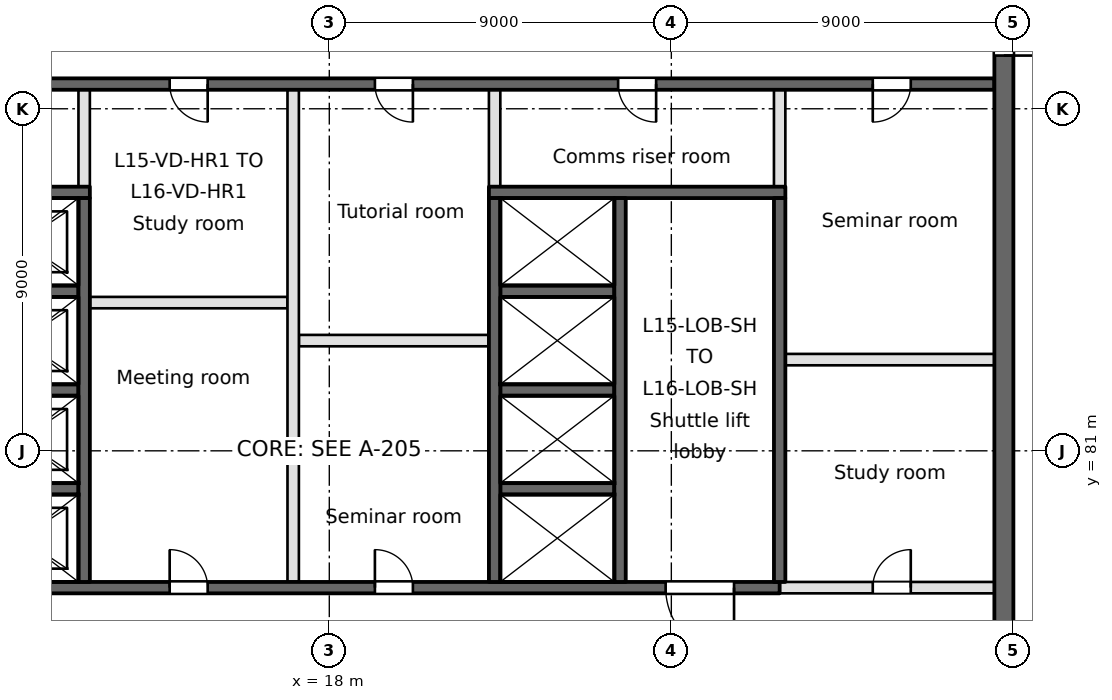
"""IFC4 building model, lengths in metres.
Left out: names, types, materials, properties, quantities, classifications, styles, units other than length and angle.
Written with IfcOpenShell. Run it as: python <this file> out.ifc"""

import sys

from ifc_helpers import new_model, si_unit, direction, frame, frame_2d, origin, place, context, subcontext, project, spatial, rectangle, extrude, element, fill, save


model = new_model("IFC4")
c1 = context("Model", 3, precision=1e-05, world=origin(), true_north=direction((0.0, 1.0)))
c2 = subcontext(c1, "Body", "Model", "MODEL_VIEW")
j1 = project(units=[si_unit("LENGTHUNIT", "METRE"), si_unit("PLANEANGLEUNIT", "RADIAN")], contexts=[c1])
p1 = place(None, origin())
s1 = spatial("IfcSite", under=j1, at=p1, CompositionType="ELEMENT")
p2 = place(p1, origin())
s2 = spatial("IfcBuilding", under=s1, at=p2, CompositionType="ELEMENT")
p3 = place(p2, frame((0.0, 0.0, 65.4)))
s3 = spatial("IfcBuildingStorey", under=s2, at=p3, CompositionType="ELEMENT", Elevation=65.4)
p4 = place(p3, frame((0.9, 77.4, -0.4), z_axis=(0.0, 0.0, 1.0), x_axis=(1.0, 0.0, 0.0)))
e1 = element("IfcWall", 1, at=p4, inside=s3, PredefinedType="SOLIDWALL", context=c2, shape_type="SweptSolid", body=[
    extrude(rectangle(XDim=28.95, YDim=0.3, at=frame_2d((14.475, 0.0))), origin(), (0.0, 0.0, 1.0), 3.7),
])
p5 = place(p4, frame((4.35, 0.0, 0.4)))
e2 = element("IfcOpeningElement", 2, at=p5, cuts=e1, PredefinedType="OPENING", context=c2, shape_type="SweptSolid", body=[
    extrude(rectangle(XDim=1.8, YDim=2.1, at=frame_2d((0.9, 1.05))), frame((0.0, 0.15, 0.0), z_axis=(0.0, -1.0, 0.0), x_axis=(1.0, 0.0, 0.0)), (0.0, 0.0, 1.0), 0.3),
])
p6 = place(p4, frame((25.95, 0.0, 0.4)))
e3 = element("IfcOpeningElement", 3, at=p6, cuts=e1, PredefinedType="OPENING", context=c2, shape_type="SweptSolid", body=[
    extrude(rectangle(XDim=1.8, YDim=2.1, at=frame_2d((0.9, 1.05))), frame((0.0, 0.15, 0.0), z_axis=(0.0, -1.0, 0.0), x_axis=(1.0, 0.0, 0.0)), (0.0, 0.0, 1.0), 0.3),
])
p7 = place(p4, frame((12.9, 0.0, 0.4)))
e4 = element("IfcOpeningElement", 4, at=p7, cuts=e1, PredefinedType="OPENING", context=c2, shape_type="SweptSolid", body=[
    extrude(rectangle(XDim=1.0, YDim=2.1, at=frame_2d((0.5, 1.05))), frame((0.0, 0.15, 0.0), z_axis=(0.0, -1.0, 0.0), x_axis=(1.0, 0.0, 0.0)), (0.0, 0.0, 1.0), 0.3),
])
p8 = place(p4, frame((18.3, 0.0, 0.4)))
e5 = element("IfcOpeningElement", 5, at=p8, cuts=e1, PredefinedType="OPENING", context=c2, shape_type="SweptSolid", body=[
    extrude(rectangle(XDim=1.0, YDim=2.1, at=frame_2d((0.5, 1.05))), frame((0.0, 0.15, 0.0), z_axis=(0.0, -1.0, 0.0), x_axis=(1.0, 0.0, 0.0)), (0.0, 0.0, 1.0), 0.3),
])
p9 = place(p3, frame((29.85, 77.4, 0.0), z_axis=(0.0, 0.0, 1.0), x_axis=(1.0, 0.0, 0.0)))
e6 = element("IfcWall", 6, at=p9, inside=s3, PredefinedType="PARTITIONING", context=c2, shape_type="SweptSolid", body=[
    extrude(rectangle(XDim=5.65, YDim=0.3, at=frame_2d((2.825, 0.0))), origin(), (0.0, 0.0, 1.0), 3.3),
])
p10 = place(p9, frame((2.45, 0.0, 0.0)))
e7 = element("IfcOpeningElement", 7, at=p10, cuts=e6, PredefinedType="OPENING", context=c2, shape_type="SweptSolid", body=[
    extrude(rectangle(XDim=1.0, YDim=2.1, at=frame_2d((0.5, 1.05))), frame((0.0, 0.15, 0.0), z_axis=(0.0, -1.0, 0.0), x_axis=(1.0, 0.0, 0.0)), (0.0, 0.0, 1.0), 0.3),
])
for number, where, z_axis, x_axis in (
    (8, (8.4, 80.0, -0.4), (0.0, 0.0, 1.0), (1.0, 0.0, 0.0)),
    (9, (22.5, 80.0, -0.4), (0.0, 0.0, 1.0), (1.0, 0.0, 0.0)),
    (10, (8.4, 82.6, -0.4), (0.0, 0.0, 1.0), (1.0, 0.0, 0.0)),
    (11, (22.5, 82.6, -0.4), (0.0, 0.0, 1.0), (1.0, 0.0, 0.0)),
):
    element("IfcWall", number, at=place(p3, frame(where, z_axis=z_axis, x_axis=x_axis)), inside=s3, PredefinedType="SOLIDWALL", context=c2, shape_type="SweptSolid", body=[
        extrude(rectangle(XDim=3.0, YDim=0.3, at=frame_2d((1.5, 0.0))), origin(), (0.0, 0.0, 1.0), 3.7),
    ])
p11 = place(p3, frame((30.0, 83.4, 0.0), z_axis=(0.0, 0.0, 1.0), x_axis=(1.0, 0.0, 0.0)))
e12 = element("IfcWall", 12, at=p11, inside=s3, PredefinedType="PARTITIONING", context=c2, shape_type="SweptSolid", body=[
    extrude(rectangle(XDim=5.5, YDim=0.3, at=frame_2d((2.75, 0.0))), origin(), (0.0, 0.0, 1.0), 3.3),
])
p12 = place(p3, frame((17.2, 83.9, 0.0), z_axis=(0.0, 0.0, 1.0), x_axis=(1.0, 0.0, 0.0)))
e13 = element("IfcWall", 13, at=p12, inside=s3, PredefinedType="PARTITIONING", context=c2, shape_type="SweptSolid", body=[
    extrude(rectangle(XDim=5.0, YDim=0.3, at=frame_2d((2.5, 0.0))), origin(), (0.0, 0.0, 1.0), 3.3),
])
p13 = place(p3, frame((11.7, 84.9, 0.0), z_axis=(0.0, 0.0, 1.0), x_axis=(1.0, 0.0, 0.0)))
e14 = element("IfcWall", 14, at=p13, inside=s3, PredefinedType="PARTITIONING", context=c2, shape_type="SweptSolid", body=[
    extrude(rectangle(XDim=5.2, YDim=0.3, at=frame_2d((2.6, 0.0))), origin(), (0.0, 0.0, 1.0), 3.3),
])
for number, where, z_axis, x_axis in (
    (15, (8.4, 85.2, -0.4), (0.0, 0.0, 1.0), (1.0, 0.0, 0.0)),
    (16, (22.5, 85.2, -0.4), (0.0, 0.0, 1.0), (1.0, 0.0, 0.0)),
):
    element("IfcWall", number, at=place(p3, frame(where, z_axis=z_axis, x_axis=x_axis)), inside=s3, PredefinedType="SOLIDWALL", context=c2, shape_type="SweptSolid", body=[
        extrude(rectangle(XDim=3.0, YDim=0.3, at=frame_2d((1.5, 0.0))), origin(), (0.0, 0.0, 1.0), 3.7),
    ])
p14 = place(p3, frame((0.9, 87.8, -0.4), z_axis=(0.0, 0.0, 1.0), x_axis=(1.0, 0.0, 0.0)))
e17 = element("IfcWall", 17, at=p14, inside=s3, PredefinedType="SOLIDWALL", context=c2, shape_type="SweptSolid", body=[
    extrude(rectangle(XDim=10.8, YDim=0.3, at=frame_2d((5.4, 0.0))), origin(), (0.0, 0.0, 1.0), 3.7),
])
p15 = place(p3, frame((22.2, 87.8, -0.4), z_axis=(0.0, 0.0, 1.0), x_axis=(1.0, 0.0, 0.0)))
e18 = element("IfcWall", 18, at=p15, inside=s3, PredefinedType="SOLIDWALL", context=c2, shape_type="SweptSolid", body=[
    extrude(rectangle(XDim=7.8, YDim=0.3, at=frame_2d((3.9, 0.0))), origin(), (0.0, 0.0, 1.0), 3.7),
])
p16 = place(p3, frame((0.9, 90.65, -0.4), z_axis=(0.0, 0.0, 1.0), x_axis=(1.0, 0.0, 0.0)))
e19 = element("IfcWall", 19, at=p16, inside=s3, PredefinedType="SOLIDWALL", context=c2, shape_type="SweptSolid", body=[
    extrude(rectangle(XDim=34.6, YDim=0.3, at=frame_2d((17.3, 0.0))), origin(), (0.0, 0.0, 1.0), 3.7),
])
p17 = place(p16, frame((4.75, 0.0, 0.4)))
e20 = element("IfcOpeningElement", 20, at=p17, cuts=e19, PredefinedType="OPENING", context=c2, shape_type="SweptSolid", body=[
    extrude(rectangle(XDim=1.0, YDim=2.1, at=frame_2d((0.5, 1.05))), frame((0.0, 0.15, 0.0), z_axis=(0.0, -1.0, 0.0), x_axis=(1.0, 0.0, 0.0)), (0.0, 0.0, 1.0), 0.3),
])
p18 = place(p16, frame((24.7, 0.0, 0.4)))
e21 = element("IfcOpeningElement", 21, at=p18, cuts=e19, PredefinedType="OPENING", context=c2, shape_type="SweptSolid", body=[
    extrude(rectangle(XDim=1.0, YDim=2.1, at=frame_2d((0.5, 1.05))), frame((0.0, 0.15, 0.0), z_axis=(0.0, -1.0, 0.0), x_axis=(1.0, 0.0, 0.0)), (0.0, 0.0, 1.0), 0.3),
])
p19 = place(p16, frame((12.9, 0.0, 0.4)))
e22 = element("IfcOpeningElement", 22, at=p19, cuts=e19, PredefinedType="OPENING", context=c2, shape_type="SweptSolid", body=[
    extrude(rectangle(XDim=1.0, YDim=2.1, at=frame_2d((0.5, 1.05))), frame((0.0, 0.15, 0.0), z_axis=(0.0, -1.0, 0.0), x_axis=(1.0, 0.0, 0.0)), (0.0, 0.0, 1.0), 0.3),
])
p20 = place(p16, frame((18.3, 0.0, 0.4)))
e23 = element("IfcOpeningElement", 23, at=p20, cuts=e19, PredefinedType="OPENING", context=c2, shape_type="SweptSolid", body=[
    extrude(rectangle(XDim=1.0, YDim=2.1, at=frame_2d((0.5, 1.05))), frame((0.0, 0.15, 0.0), z_axis=(0.0, -1.0, 0.0), x_axis=(1.0, 0.0, 0.0)), (0.0, 0.0, 1.0), 0.3),
])
p21 = place(p16, frame((31.4, 0.0, 0.4)))
e24 = element("IfcOpeningElement", 24, at=p21, cuts=e19, PredefinedType="OPENING", context=c2, shape_type="SweptSolid", body=[
    extrude(rectangle(XDim=1.0, YDim=2.1, at=frame_2d((0.5, 1.05))), frame((0.0, 0.15, 0.0), z_axis=(0.0, -1.0, 0.0), x_axis=(1.0, 0.0, 0.0)), (0.0, 0.0, 1.0), 0.3),
])
p22 = place(p3, frame((11.55, 77.55, -0.4), z_axis=(0.0, 0.0, 1.0), x_axis=(0.0, 1.0, 0.0)))
e25 = element("IfcWall", 25, at=p22, inside=s3, PredefinedType="SOLIDWALL", context=c2, shape_type="SweptSolid", body=[
    extrude(rectangle(XDim=10.1, YDim=0.3, at=frame_2d((5.05, 0.0))), origin(), (0.0, 0.0, 1.0), 3.7),
])
p23 = place(p3, frame((11.55, 87.95, 0.0), z_axis=(0.0, 0.0, 1.0), x_axis=(0.0, 1.0, 0.0)))
e26 = element("IfcWall", 26, at=p23, inside=s3, PredefinedType="PARTITIONING", context=c2, shape_type="SweptSolid", body=[
    extrude(rectangle(XDim=2.55, YDim=0.3, at=frame_2d((1.275, 0.0))), origin(), (0.0, 0.0, 1.0), 3.3),
])
p24 = place(p3, frame((17.05, 77.55, 0.0), z_axis=(0.0, 0.0, 1.0), x_axis=(0.0, 1.0, 0.0)))
e27 = element("IfcWall", 27, at=p24, inside=s3, PredefinedType="PARTITIONING", context=c2, shape_type="SweptSolid", body=[
    extrude(rectangle(XDim=12.95, YDim=0.3, at=frame_2d((6.475, 0.0))), origin(), (0.0, 0.0, 1.0), 3.3),
])
p25 = place(p3, frame((22.35, 77.55, -0.4), z_axis=(0.0, 0.0, 1.0), x_axis=(0.0, 1.0, 0.0)))
e28 = element("IfcWall", 28, at=p25, inside=s3, PredefinedType="SOLIDWALL", context=c2, shape_type="SweptSolid", body=[
    extrude(rectangle(XDim=10.1, YDim=0.3, at=frame_2d((5.05, 0.0))), origin(), (0.0, 0.0, 1.0), 3.7),
])
p26 = place(p3, frame((22.35, 87.95, 0.0), z_axis=(0.0, 0.0, 1.0), x_axis=(0.0, 1.0, 0.0)))
e29 = element("IfcWall", 29, at=p26, inside=s3, PredefinedType="PARTITIONING", context=c2, shape_type="SweptSolid", body=[
    extrude(rectangle(XDim=2.55, YDim=0.3, at=frame_2d((1.275, 0.0))), origin(), (0.0, 0.0, 1.0), 3.3),
])
for number, where, z_axis, x_axis in (
    (30, (25.65, 77.55, -0.4), (0.0, 0.0, 1.0), (0.0, 1.0, 0.0)),
    (31, (29.85, 77.55, -0.4), (0.0, 0.0, 1.0), (0.0, 1.0, 0.0)),
):
    element("IfcWall", number, at=place(p3, frame(where, z_axis=z_axis, x_axis=x_axis)), inside=s3, PredefinedType="SOLIDWALL", context=c2, shape_type="SweptSolid", body=[
        extrude(rectangle(XDim=10.1, YDim=0.3, at=frame_2d((5.05, 0.0))), origin(), (0.0, 0.0, 1.0), 3.7),
    ])
p27 = place(p3, frame((29.85, 87.95, 0.0), z_axis=(0.0, 0.0, 1.0), x_axis=(0.0, 1.0, 0.0)))
e32 = element("IfcWall", 32, at=p27, inside=s3, PredefinedType="PARTITIONING", context=c2, shape_type="SweptSolid", body=[
    extrude(rectangle(XDim=2.55, YDim=0.3, at=frame_2d((1.275, 0.0))), origin(), (0.0, 0.0, 1.0), 3.3),
])
p28 = place(p3, frame((35.75, 63.5, -0.4), z_axis=(0.0, 0.0, 1.0), x_axis=(0.0, 1.0, 0.0)))
e33 = element("IfcWall", 33, at=p28, inside=s3, PredefinedType="SOLIDWALL", context=c2, shape_type="SweptSolid", body=[
    extrude(rectangle(XDim=34.6, YDim=0.5, at=frame_2d((17.3, 0.0))), origin(), (0.0, 0.0, 1.0), 3.7),
])
p29 = place(p28, frame((9.7, 0.0, 0.4)))
e34 = element("IfcOpeningElement", 34, at=p29, cuts=e33, PredefinedType="OPENING", context=c2, shape_type="SweptSolid", body=[
    extrude(rectangle(XDim=2.4, YDim=2.1, at=frame_2d((1.2, 1.05))), frame((0.0, 0.25, 0.0), z_axis=(0.0, -1.0, 0.0), x_axis=(1.0, 0.0, 0.0)), (0.0, 0.0, 1.0), 0.5),
])
p30 = place(p28, frame((27.9, 0.0, 0.4)))
e35 = element("IfcOpeningElement", 35, at=p30, cuts=e33, PredefinedType="OPENING", context=c2, shape_type="SweptSolid", body=[
    extrude(rectangle(XDim=1.5, YDim=2.1, at=frame_2d((0.75, 1.05))), frame((0.0, 0.25, 0.0), z_axis=(0.0, -1.0, 0.0), x_axis=(1.0, 0.0, 0.0)), (0.0, 0.0, 1.0), 0.5),
])
p31 = place(p28, frame((1.5, 0.0, 0.4)))
e36 = element("IfcOpeningElement", 36, at=p31, cuts=e33, PredefinedType="OPENING", context=c2, shape_type="SweptSolid", body=[
    extrude(rectangle(XDim=1.2, YDim=2.1, at=frame_2d((0.6, 1.05))), frame((0.0, 0.25, 0.0), z_axis=(0.0, -1.0, 0.0), x_axis=(1.0, 0.0, 0.0)), (0.0, 0.0, 1.0), 0.5),
])
p32 = place(p6, frame((1.8, 0.0, 0.0), z_axis=(0.0, 0.0, 1.0), x_axis=(-1.0, 0.0, 0.0)))
e37 = element("IfcDoor", 37, at=p32, inside=s3, OperationType="SINGLE_SWING_LEFT", PredefinedType="DOOR", context=c2, shape_type="SweptSolid", body=[
    extrude(rectangle(XDim=1.8, YDim=2.1, at=frame_2d((0.9, 1.05))), frame((0.0, 0.025, 0.0), z_axis=(0.0, -1.0, 0.0), x_axis=(1.0, 0.0, 0.0)), (0.0, 0.0, 1.0), 0.05),
])
fill(e3, e37)
p33 = place(p30, frame((1.5, 0.0, 0.0), z_axis=(0.0, 0.0, 1.0), x_axis=(-1.0, 0.0, 0.0)))
e38 = element("IfcDoor", 38, at=p33, inside=s3, OperationType="SINGLE_SWING_RIGHT", PredefinedType="DOOR", context=c2, shape_type="SweptSolid", body=[
    extrude(rectangle(XDim=1.5, YDim=2.1, at=frame_2d((0.75, 1.05))), frame((0.0, 0.025, 0.0), z_axis=(0.0, -1.0, 0.0), x_axis=(1.0, 0.0, 0.0)), (0.0, 0.0, 1.0), 0.05),
])
fill(e35, e38)
p34 = place(p18, frame((1.0, 0.0, 0.0), z_axis=(0.0, 0.0, 1.0), x_axis=(-1.0, 0.0, 0.0)))
e39 = element("IfcDoor", 39, at=p34, inside=s3, OperationType="SINGLE_SWING_LEFT", PredefinedType="DOOR", context=c2, shape_type="SweptSolid", body=[
    extrude(rectangle(XDim=1.0, YDim=2.1, at=frame_2d((0.5, 1.05))), frame((0.0, 0.025, 0.0), z_axis=(0.0, -1.0, 0.0), x_axis=(1.0, 0.0, 0.0)), (0.0, 0.0, 1.0), 0.05),
])
fill(e21, e39)
p35 = place(p7, origin())
e40 = element("IfcDoor", 40, at=p35, inside=s3, OperationType="SINGLE_SWING_LEFT", PredefinedType="DOOR", context=c2, shape_type="SweptSolid", body=[
    extrude(rectangle(XDim=1.0, YDim=2.1, at=frame_2d((0.5, 1.05))), frame((0.0, 0.025, 0.0), z_axis=(0.0, -1.0, 0.0), x_axis=(1.0, 0.0, 0.0)), (0.0, 0.0, 1.0), 0.05),
])
fill(e4, e40)
p36 = place(p19, frame((1.0, 0.0, 0.0), z_axis=(0.0, 0.0, 1.0), x_axis=(-1.0, 0.0, 0.0)))
e41 = element("IfcDoor", 41, at=p36, inside=s3, OperationType="SINGLE_SWING_LEFT", PredefinedType="DOOR", context=c2, shape_type="SweptSolid", body=[
    extrude(rectangle(XDim=1.0, YDim=2.1, at=frame_2d((0.5, 1.05))), frame((0.0, 0.025, 0.0), z_axis=(0.0, -1.0, 0.0), x_axis=(1.0, 0.0, 0.0)), (0.0, 0.0, 1.0), 0.05),
])
fill(e22, e41)
p37 = place(p8, origin())
e42 = element("IfcDoor", 42, at=p37, inside=s3, OperationType="SINGLE_SWING_LEFT", PredefinedType="DOOR", context=c2, shape_type="SweptSolid", body=[
    extrude(rectangle(XDim=1.0, YDim=2.1, at=frame_2d((0.5, 1.05))), frame((0.0, 0.025, 0.0), z_axis=(0.0, -1.0, 0.0), x_axis=(1.0, 0.0, 0.0)), (0.0, 0.0, 1.0), 0.05),
])
fill(e5, e42)
p38 = place(p20, frame((1.0, 0.0, 0.0), z_axis=(0.0, 0.0, 1.0), x_axis=(-1.0, 0.0, 0.0)))
e43 = element("IfcDoor", 43, at=p38, inside=s3, OperationType="SINGLE_SWING_LEFT", PredefinedType="DOOR", context=c2, shape_type="SweptSolid", body=[
    extrude(rectangle(XDim=1.0, YDim=2.1, at=frame_2d((0.5, 1.05))), frame((0.0, 0.025, 0.0), z_axis=(0.0, -1.0, 0.0), x_axis=(1.0, 0.0, 0.0)), (0.0, 0.0, 1.0), 0.05),
])
fill(e23, e43)
p39 = place(p10, origin())
e44 = element("IfcDoor", 44, at=p39, inside=s3, OperationType="SINGLE_SWING_RIGHT", PredefinedType="DOOR", context=c2, shape_type="SweptSolid", body=[
    extrude(rectangle(XDim=1.0, YDim=2.1, at=frame_2d((0.5, 1.05))), frame((0.0, 0.025, 0.0), z_axis=(0.0, -1.0, 0.0), x_axis=(1.0, 0.0, 0.0)), (0.0, 0.0, 1.0), 0.05),
])
fill(e7, e44)
p40 = place(p21, frame((1.0, 0.0, 0.0), z_axis=(0.0, 0.0, 1.0), x_axis=(-1.0, 0.0, 0.0)))
e45 = element("IfcDoor", 45, at=p40, inside=s3, OperationType="SINGLE_SWING_RIGHT", PredefinedType="DOOR", context=c2, shape_type="SweptSolid", body=[
    extrude(rectangle(XDim=1.0, YDim=2.1, at=frame_2d((0.5, 1.05))), frame((0.0, 0.025, 0.0), z_axis=(0.0, -1.0, 0.0), x_axis=(1.0, 0.0, 0.0)), (0.0, 0.0, 1.0), 0.05),
])
fill(e24, e45)
save(model, sys.argv[1])
